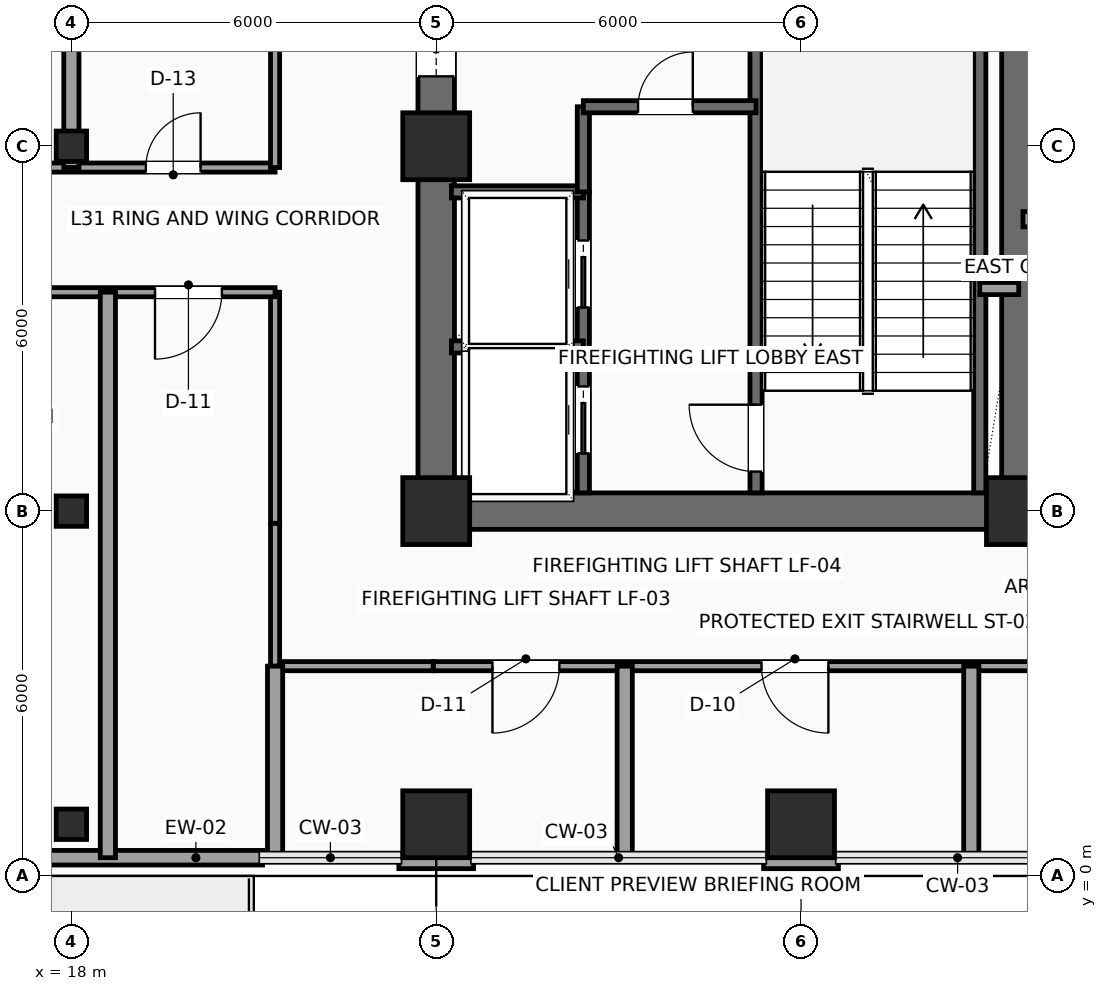
"""IFC4 building model, lengths in metres.
Left out: names, types, materials, properties, quantities, classifications, styles, units other than length and angle.
Written with IfcOpenShell. Run it as: python <this file> out.ifc"""

import sys

from ifc_helpers import new_model, si_unit, direction, frame, frame_2d, origin, origin_2d, place, context, subcontext, project, spatial, rectangle, hollow_rectangle, extrude, element, fill, save


model = new_model("IFC4")
c1 = context("Model", 3, precision=1e-05, world=origin(), true_north=direction((0.0, 1.0)))
c2 = subcontext(c1, "Body", "Model", "MODEL_VIEW")
j1 = project(units=[si_unit("LENGTHUNIT", "METRE"), si_unit("PLANEANGLEUNIT", "RADIAN")], contexts=[c1])
p1 = place(None, origin())
s1 = spatial("IfcSite", under=j1, at=p1, CompositionType="ELEMENT")
p2 = place(p1, origin())
s2 = spatial("IfcBuilding", under=s1, at=p2, CompositionType="ELEMENT")
p3 = place(p2, frame((0.0, 0.0, 130.65)))
s3 = spatial("IfcBuildingStorey", under=s2, at=p3, CompositionType="ELEMENT", Elevation=130.65)
for number, where, z_axis, x_axis in (
    (1, (24.0, 6.0, 0.0), (0.0, 0.0, 1.0), (1.0, 0.0, 0.0)),
    (2, (24.0, 12.0, 0.0), (0.0, 0.0, 1.0), (1.0, 0.0, 0.0)),
    (3, (33.6, 6.0, 0.0), (0.0, 0.0, 1.0), (1.0, 0.0, 0.0)),
):
    element("IfcColumn", number, at=place(p3, frame(where, z_axis=z_axis, x_axis=x_axis)), inside=s3, PredefinedType="COLUMN", context=c2, shape_type="SweptSolid", body=[
        extrude(rectangle(XDim=1.1, YDim=1.1, at=origin_2d()), origin(), (0.0, 0.0, 1.0), 3.75),
    ])
for number, where, z_axis, x_axis in (
    (4, (18.0, 0.85, 0.0), (0.0, 0.0, 1.0), (1.0, 0.0, 0.0)),
    (5, (18.0, 6.0, 0.0), (0.0, 0.0, 1.0), (1.0, 0.0, 0.0)),
    (6, (18.0, 12.0, 0.0), (0.0, 0.0, 1.0), (1.0, 0.0, 0.0)),
):
    element("IfcColumn", number, at=place(p3, frame(where, z_axis=z_axis, x_axis=x_axis)), inside=s3, PredefinedType="COLUMN", context=c2, shape_type="SweptSolid", body=[
        extrude(hollow_rectangle(XDim=0.5, YDim=0.5, WallThickness=0.025, InnerFilletRadius=0.025, OuterFilletRadius=0.04, at=origin_2d()), origin(), (0.0, 0.0, 1.0), 3.75),
    ])
for number, where, z_axis, x_axis in (
    (7, (24.0, 0.85, 0.0), (0.0, 0.0, 1.0), (1.0, 0.0, 0.0)),
    (8, (30.0, 0.85, 0.0), (0.0, 0.0, 1.0), (1.0, 0.0, 0.0)),
):
    element("IfcColumn", number, at=place(p3, frame(where, z_axis=z_axis, x_axis=x_axis)), inside=s3, PredefinedType="COLUMN", context=c2, shape_type="SweptSolid", body=[
        extrude(rectangle(XDim=1.1, YDim=1.1, at=origin_2d()), origin(), (0.0, 0.0, 1.0), 3.75),
    ])
p4 = place(p3, frame((21.145, 0.3, 0.0), z_axis=(0.0, 0.0, 1.0), x_axis=(-1.0, 0.0, 0.0)))
e9 = element("IfcWall", 9, at=p4, inside=s3, PredefinedType="SOLIDWALL", context=c2, shape_type="SweptSolid", body=[
    extrude(rectangle(XDim=9.29, YDim=0.24, at=frame_2d((4.645, 0.0))), origin(), (0.0, 0.0, 1.0), 3.525),
])
p5 = place(p4, frame((3.945, 0.0, 0.0)))
e10 = element("IfcOpeningElement", 10, at=p5, cuts=e9, PredefinedType="OPENING", context=c2, shape_type="SweptSolid", body=[
    extrude(rectangle(XDim=1.05, YDim=2.2, at=frame_2d((0.525, 1.1))), frame((0.0, 0.13, 0.0), z_axis=(0.0, -1.0, 0.0), x_axis=(1.0, 0.0, 0.0)), (0.0, 0.0, 1.0), 0.26),
])
p6 = place(p4, frame((5.345, 0.0, 0.85)))
e11 = element("IfcOpeningElement", 11, at=p6, cuts=e9, PredefinedType="OPENING", context=c2, shape_type="SweptSolid", body=[
    extrude(rectangle(XDim=1.8, YDim=2.1, at=frame_2d((0.9, 1.05))), frame((0.0, 0.13, 0.0), z_axis=(0.0, -1.0, 0.0), x_axis=(1.0, 0.0, 0.0)), (0.0, 0.0, 1.0), 0.26),
])
for number, where, z_axis, x_axis in (
    (12, (30.615, 0.24, 0.0), (0.0, 0.0, 1.0), (-1.0, 0.0, 0.0)),
    (13, (24.615, 0.24, 0.0), (0.0, 0.0, 1.0), (-1.0, 0.0, 0.0)),
):
    element("IfcWall", number, at=place(p3, frame(where, z_axis=z_axis, x_axis=x_axis)), inside=s3, PredefinedType="SOLIDWALL", context=c2, shape_type="SweptSolid", body=[
        extrude(rectangle(XDim=1.23, YDim=0.24, at=frame_2d((0.615, 0.0))), origin(), (0.0, 0.0, 1.0), 3.525),
    ])
p7 = place(p3, frame((24.0, 6.0, 0.0), z_axis=(0.0, 0.0, 1.0), x_axis=(1.0, 0.0, 0.0)))
e14 = element("IfcWall", 14, at=p7, inside=s3, PredefinedType="SHEAR", context=c2, shape_type="SweptSolid", body=[
    extrude(rectangle(XDim=9.6, YDim=0.6, at=frame_2d((4.8, 0.0))), origin(), (0.0, 0.0, 1.0), 3.525),
])
p8 = place(p3, frame((24.0, 6.0, 0.0), z_axis=(0.0, 0.0, 1.0), x_axis=(0.0, 1.0, 0.0)))
e15 = element("IfcWall", 15, at=p8, inside=s3, PredefinedType="SHEAR", context=c2, shape_type="SweptSolid", body=[
    extrude(rectangle(XDim=12.0, YDim=0.6, at=frame_2d((6.0, 0.0))), origin(), (0.0, 0.0, 1.0), 3.525),
])
p9 = place(p8, frame((7.15, 0.0, 0.0)))
e16 = element("IfcOpeningElement", 16, at=p9, cuts=e15, PredefinedType="OPENING", context=c2, shape_type="SweptSolid", body=[
    extrude(rectangle(XDim=1.6, YDim=2.3, at=frame_2d((0.8, 1.15))), frame((0.0, 0.31, 0.0), z_axis=(0.0, -1.0, 0.0), x_axis=(1.0, 0.0, 0.0)), (0.0, 0.0, 1.0), 0.62),
])
p10 = place(p3, frame((33.6, 6.0, 0.0), z_axis=(0.0, 0.0, 1.0), x_axis=(0.0, 1.0, 0.0)))
e17 = element("IfcWall", 17, at=p10, inside=s3, PredefinedType="SHEAR", context=c2, shape_type="SweptSolid", body=[
    extrude(rectangle(XDim=12.0, YDim=0.6, at=frame_2d((6.0, 0.0))), origin(), (0.0, 0.0, 1.0), 3.525),
])
p11 = place(p10, frame((10.2, 0.0, 0.0)))
e18 = element("IfcOpeningElement", 18, at=p11, cuts=e17, PredefinedType="OPENING", context=c2, shape_type="SweptSolid", body=[
    extrude(rectangle(XDim=0.9, YDim=2.15, at=frame_2d((0.45, 1.075))), frame((0.0, 0.31, 0.0), z_axis=(0.0, -1.0, 0.0), x_axis=(1.0, 0.0, 0.0)), (0.0, 0.0, 1.0), 0.62),
])
p12 = place(p3, frame((29.26, 6.3, 0.0), z_axis=(0.0, 0.0, 1.0), x_axis=(0.0, 1.0, 0.0)))
e19 = element("IfcWall", 19, at=p12, inside=s3, PredefinedType="SHEAR", context=c2, shape_type="SweptSolid", body=[
    extrude(rectangle(XDim=8.88, YDim=0.2, at=frame_2d((4.44, 0.0))), origin(), (0.0, 0.0, 1.0), 3.525),
])
p13 = place(p12, frame((0.35, 0.0, 0.0)))
e20 = element("IfcOpeningElement", 20, at=p13, cuts=e19, PredefinedType="OPENING", context=c2, shape_type="SweptSolid", body=[
    extrude(rectangle(XDim=1.1, YDim=2.2, at=frame_2d((0.55, 1.1))), frame((0.0, 0.11, 0.0), z_axis=(0.0, -1.0, 0.0), x_axis=(1.0, 0.0, 0.0)), (0.0, 0.0, 1.0), 0.22),
])
p14 = place(p3, frame((32.94, 6.3, 0.0), z_axis=(0.0, 0.0, 1.0), x_axis=(0.0, 1.0, 0.0)))
e21 = element("IfcWall", 21, at=p14, inside=s3, PredefinedType="SHEAR", context=c2, shape_type="SweptSolid", body=[
    extrude(rectangle(XDim=8.88, YDim=0.2, at=frame_2d((4.44, 0.0))), origin(), (0.0, 0.0, 1.0), 3.525),
])
p15 = place(p3, frame((26.42, 6.3, 0.0), z_axis=(0.0, 0.0, 1.0), x_axis=(0.0, 1.0, 0.0)))
e22 = element("IfcWall", 22, at=p15, inside=s3, PredefinedType="SHEAR", context=c2, shape_type="SweptSolid", body=[
    extrude(rectangle(XDim=4.95, YDim=0.2, at=frame_2d((2.475, 0.0))), origin(), (0.0, 0.0, 1.0), 3.525),
])
p16 = place(p15, frame((0.65, 0.0, 0.0)))
e23 = element("IfcOpeningElement", 23, at=p16, cuts=e22, PredefinedType="OPENING", context=c2, shape_type="SweptSolid", body=[
    extrude(rectangle(XDim=1.1, YDim=2.2, at=frame_2d((0.55, 1.1))), frame((0.0, 0.11, 0.0), z_axis=(0.0, -1.0, 0.0), x_axis=(1.0, 0.0, 0.0)), (0.0, 0.0, 1.0), 0.22),
])
p17 = place(p15, frame((3.05, 0.0, 0.0)))
e24 = element("IfcOpeningElement", 24, at=p17, cuts=e22, PredefinedType="OPENING", context=c2, shape_type="SweptSolid", body=[
    extrude(rectangle(XDim=1.1, YDim=2.2, at=frame_2d((0.55, 1.1))), frame((0.0, 0.11, 0.0), z_axis=(0.0, -1.0, 0.0), x_axis=(1.0, 0.0, 0.0)), (0.0, 0.0, 1.0), 0.22),
])
for number, where, z_axis, x_axis in (
    (25, (24.25, 8.7, 0.0), (0.0, 0.0, 1.0), (1.0, 0.0, 0.0)),
    (26, (24.25, 11.25, 0.0), (0.0, 0.0, 1.0), (1.0, 0.0, 0.0)),
):
    element("IfcWall", number, at=place(p3, frame(where, z_axis=z_axis, x_axis=x_axis)), inside=s3, PredefinedType="SHEAR", context=c2, shape_type="SweptSolid", body=[
        extrude(rectangle(XDim=2.17, YDim=0.2, at=frame_2d((1.085, 0.0))), origin(), (0.0, 0.0, 1.0), 3.525),
    ])
p18 = place(p3, frame((26.42, 11.25, 0.0), z_axis=(0.0, 0.0, 1.0), x_axis=(0.0, 1.0, 0.0)))
e27 = element("IfcWall", 27, at=p18, inside=s3, PredefinedType="SHEAR", context=c2, shape_type="SweptSolid", body=[
    extrude(rectangle(XDim=1.4, YDim=0.2, at=frame_2d((0.7, 0.0))), origin(), (0.0, 0.0, 1.0), 3.525),
])
p19 = place(p3, frame((26.42, 12.65, 0.0), z_axis=(0.0, 0.0, 1.0), x_axis=(1.0, 0.0, 0.0)))
e28 = element("IfcWall", 28, at=p19, inside=s3, PredefinedType="SHEAR", context=c2, shape_type="SweptSolid", body=[
    extrude(rectangle(XDim=2.84, YDim=0.2, at=frame_2d((1.42, 0.0))), origin(), (0.0, 0.0, 1.0), 3.525),
])
p20 = place(p19, frame((0.9, 0.0, 0.0)))
e29 = element("IfcOpeningElement", 29, at=p20, cuts=e28, PredefinedType="OPENING", context=c2, shape_type="SweptSolid", body=[
    extrude(rectangle(XDim=0.9, YDim=2.15, at=frame_2d((0.45, 1.075))), frame((0.0, 0.11, 0.0), z_axis=(0.0, -1.0, 0.0), x_axis=(1.0, 0.0, 0.0)), (0.0, 0.0, 1.0), 0.22),
])
p21 = place(p3, frame((32.94, 9.66, 0.0), z_axis=(0.0, 0.0, 1.0), x_axis=(1.0, 0.0, 0.0)))
e30 = element("IfcWall", 30, at=p21, inside=s3, PredefinedType="SOLIDWALL", context=c2, shape_type="SweptSolid", body=[
    extrude(rectangle(XDim=0.64, YDim=0.2, at=frame_2d((0.32, 0.0))), origin(), (0.0, 0.0, 1.0), 3.525),
])
p22 = place(p3, frame((36.15, 3.45, 0.0), z_axis=(0.0, 0.0, 1.0), x_axis=(-1.0, 0.0, 0.0)))
e31 = element("IfcWall", 31, at=p22, inside=s3, PredefinedType="PARTITIONING", context=c2, shape_type="SweptSolid", body=[
    extrude(rectangle(XDim=12.2, YDim=0.15, at=frame_2d((6.1, 0.0))), origin(), (0.0, 0.0, 1.0), 3.067),
])
p23 = place(p22, frame((10.125, 0.0, 0.0)))
e32 = element("IfcOpeningElement", 32, at=p23, cuts=e31, PredefinedType="OPENING", context=c2, shape_type="SweptSolid", body=[
    extrude(rectangle(XDim=1.1, YDim=2.25, at=frame_2d((0.55, 1.125))), frame((0.0, 0.085, 0.0), z_axis=(0.0, -1.0, 0.0), x_axis=(1.0, 0.0, 0.0)), (0.0, 0.0, 1.0), 0.17),
])
p24 = place(p22, frame((5.7, 0.0, 0.0)))
e33 = element("IfcOpeningElement", 33, at=p24, cuts=e31, PredefinedType="OPENING", context=c2, shape_type="SweptSolid", body=[
    extrude(rectangle(XDim=1.1, YDim=2.25, at=frame_2d((0.55, 1.125))), frame((0.0, 0.085, 0.0), z_axis=(0.0, -1.0, 0.0), x_axis=(1.0, 0.0, 0.0)), (0.0, 0.0, 1.0), 0.17),
])
p25 = place(p3, frame((23.95, 3.45, 0.0), z_axis=(0.0, 0.0, 1.0), x_axis=(-1.0, 0.0, 0.0)))
e34 = element("IfcWall", 34, at=p25, inside=s3, PredefinedType="PARTITIONING", context=c2, shape_type="SweptSolid", body=[
    extrude(rectangle(XDim=2.6, YDim=0.15, at=frame_2d((1.3, 0.0))), origin(), (0.0, 0.0, 1.0), 3.067),
])
p26 = place(p3, frame((21.35, 3.45, 0.0), z_axis=(0.0, 0.0, 1.0), x_axis=(0.0, 1.0, 0.0)))
e35 = element("IfcWall", 35, at=p26, inside=s3, PredefinedType="PARTITIONING", context=c2, shape_type="SweptSolid", body=[
    extrude(rectangle(XDim=2.35, YDim=0.15, at=frame_2d((1.175, 0.0))), origin(), (0.0, 0.0, 1.0), 3.525),
])
p27 = place(p3, frame((21.35, 5.8, 0.0), z_axis=(0.0, 0.0, 1.0), x_axis=(0.0, 1.0, 0.0)))
e36 = element("IfcWall", 36, at=p27, inside=s3, PredefinedType="PARTITIONING", context=c2, shape_type="SweptSolid", body=[
    extrude(rectangle(XDim=3.8, YDim=0.15, at=frame_2d((1.9, 0.0))), origin(), (0.0, 0.0, 1.0), 3.525),
])
p28 = place(p3, frame((21.35, 9.6, 0.0), z_axis=(0.0, 0.0, 1.0), x_axis=(-1.0, 0.0, 0.0)))
e37 = element("IfcWall", 37, at=p28, inside=s3, PredefinedType="PARTITIONING", context=c2, shape_type="SweptSolid", body=[
    extrude(rectangle(XDim=18.15, YDim=0.15, at=frame_2d((9.075, 0.0))), origin(), (0.0, 0.0, 1.0), 3.525),
])
p29 = place(p28, frame((13.55, 0.0, 0.0)))
e38 = element("IfcOpeningElement", 38, at=p29, cuts=e37, PredefinedType="OPENING", context=c2, shape_type="SweptSolid", body=[
    extrude(rectangle(XDim=1.1, YDim=2.25, at=frame_2d((0.55, 1.125))), frame((0.0, 0.085, 0.0), z_axis=(0.0, -1.0, 0.0), x_axis=(1.0, 0.0, 0.0)), (0.0, 0.0, 1.0), 0.17),
])
p30 = place(p28, frame((5.85, 0.0, 0.0)))
e39 = element("IfcOpeningElement", 39, at=p30, cuts=e37, PredefinedType="OPENING", context=c2, shape_type="SweptSolid", body=[
    extrude(rectangle(XDim=1.1, YDim=2.25, at=frame_2d((0.55, 1.125))), frame((0.0, 0.085, 0.0), z_axis=(0.0, -1.0, 0.0), x_axis=(1.0, 0.0, 0.0)), (0.0, 0.0, 1.0), 0.17),
])
p31 = place(p28, frame((0.875, 0.0, 0.0)))
e40 = element("IfcOpeningElement", 40, at=p31, cuts=e37, PredefinedType="OPENING", context=c2, shape_type="SweptSolid", body=[
    extrude(rectangle(XDim=1.1, YDim=2.25, at=frame_2d((0.55, 1.125))), frame((0.0, 0.085, 0.0), z_axis=(0.0, -1.0, 0.0), x_axis=(1.0, 0.0, 0.0)), (0.0, 0.0, 1.0), 0.17),
])
p32 = place(p3, frame((10.8, 11.65, 0.0), z_axis=(0.0, 0.0, 1.0), x_axis=(1.0, 0.0, 0.0)))
e41 = element("IfcWall", 41, at=p32, inside=s3, PredefinedType="PARTITIONING", context=c2, shape_type="SweptSolid", body=[
    extrude(rectangle(XDim=10.55, YDim=0.15, at=frame_2d((5.275, 0.0))), origin(), (0.0, 0.0, 1.0), 3.525),
])
p33 = place(p32, frame((1.98, 0.0, 0.0)))
e42 = element("IfcOpeningElement", 42, at=p33, cuts=e41, PredefinedType="OPENING", context=c2, shape_type="SweptSolid", body=[
    extrude(rectangle(XDim=1.1, YDim=2.25, at=frame_2d((0.55, 1.125))), frame((0.0, 0.085, 0.0), z_axis=(0.0, -1.0, 0.0), x_axis=(1.0, 0.0, 0.0)), (0.0, 0.0, 1.0), 0.17),
])
p34 = place(p32, frame((4.95, 0.0, 0.0)))
e43 = element("IfcOpeningElement", 43, at=p34, cuts=e41, PredefinedType="OPENING", context=c2, shape_type="SweptSolid", body=[
    extrude(rectangle(XDim=0.9, YDim=2.1, at=frame_2d((0.45, 1.05))), frame((0.0, 0.085, 0.0), z_axis=(0.0, -1.0, 0.0), x_axis=(1.0, 0.0, 0.0)), (0.0, 0.0, 1.0), 0.17),
])
p35 = place(p32, frame((8.425, 0.0, 0.0)))
e44 = element("IfcOpeningElement", 44, at=p35, cuts=e41, PredefinedType="OPENING", context=c2, shape_type="SweptSolid", body=[
    extrude(rectangle(XDim=0.9, YDim=2.1, at=frame_2d((0.45, 1.05))), frame((0.0, 0.085, 0.0), z_axis=(0.0, -1.0, 0.0), x_axis=(1.0, 0.0, 0.0)), (0.0, 0.0, 1.0), 0.17),
])
p36 = place(p3, frame((21.35, 11.65, 0.0), z_axis=(0.0, 0.0, 1.0), x_axis=(0.0, 1.0, 0.0)))
e45 = element("IfcWall", 45, at=p36, inside=s3, PredefinedType="PARTITIONING", context=c2, shape_type="SweptSolid", body=[
    extrude(rectangle(XDim=18.6, YDim=0.15, at=frame_2d((9.3, 0.0))), origin(), (0.0, 0.0, 1.0), 3.525),
])
p37 = place(p36, frame((7.2, 0.0, 0.0)))
e46 = element("IfcOpeningElement", 46, at=p37, cuts=e45, PredefinedType="OPENING", context=c2, shape_type="SweptSolid", body=[
    extrude(rectangle(XDim=0.95, YDim=2.15, at=frame_2d((0.475, 1.075))), frame((0.0, 0.085, 0.0), z_axis=(0.0, -1.0, 0.0), x_axis=(1.0, 0.0, 0.0)), (0.0, 0.0, 1.0), 0.17),
])
p38 = place(p36, frame((10.45, 0.0, 0.0)))
e47 = element("IfcOpeningElement", 47, at=p38, cuts=e45, PredefinedType="OPENING", context=c2, shape_type="SweptSolid", body=[
    extrude(rectangle(XDim=0.9, YDim=2.1, at=frame_2d((0.45, 1.05))), frame((0.0, 0.085, 0.0), z_axis=(0.0, -1.0, 0.0), x_axis=(1.0, 0.0, 0.0)), (0.0, 0.0, 1.0), 0.17),
])
p39 = place(p36, frame((13.9, 0.0, 0.0)))
e48 = element("IfcOpeningElement", 48, at=p39, cuts=e45, PredefinedType="OPENING", context=c2, shape_type="SweptSolid", body=[
    extrude(rectangle(XDim=0.95, YDim=2.15, at=frame_2d((0.475, 1.075))), frame((0.0, 0.085, 0.0), z_axis=(0.0, -1.0, 0.0), x_axis=(1.0, 0.0, 0.0)), (0.0, 0.0, 1.0), 0.17),
])
p40 = place(p36, frame((4.6, 0.0, 0.0)))
e49 = element("IfcOpeningElement", 49, at=p40, cuts=e45, PredefinedType="OPENING", context=c2, shape_type="SweptSolid", body=[
    extrude(rectangle(XDim=1.1, YDim=2.25, at=frame_2d((0.55, 1.125))), frame((0.0, 0.085, 0.0), z_axis=(0.0, -1.0, 0.0), x_axis=(1.0, 0.0, 0.0)), (0.0, 0.0, 1.0), 0.17),
])
p41 = place(p3, frame((18.0, 11.65, 0.0), z_axis=(0.0, 0.0, 1.0), x_axis=(0.0, 1.0, 0.0)))
e50 = element("IfcWall", 50, at=p41, inside=s3, PredefinedType="PARTITIONING", context=c2, shape_type="SweptSolid", body=[
    extrude(rectangle(XDim=3.9, YDim=0.25, at=frame_2d((1.95, 0.0))), origin(), (0.0, 0.0, 1.0), 3.017),
])
for number, where, z_axis, x_axis in (
    (51, (21.35, 0.3, 0.0), (0.0, 0.0, 1.0), (0.0, 1.0, 0.0)),
    (52, (27.1, 0.3, 0.0), (0.0, 0.0, 1.0), (0.0, 1.0, 0.0)),
    (53, (32.8, 0.3, 0.0), (0.0, 0.0, 1.0), (0.0, 1.0, 0.0)),
):
    element("IfcWall", number, at=place(p3, frame(where, z_axis=z_axis, x_axis=x_axis)), inside=s3, PredefinedType="PARTITIONING", context=c2, shape_type="SweptSolid", body=[
        extrude(rectangle(XDim=3.15, YDim=0.25, at=frame_2d((1.575, 0.0))), origin(), (0.0, 0.0, 1.0), 3.525),
    ])
p42 = place(p3, frame((33.65, 5.8, 0.0), z_axis=(0.0, 0.0, 1.0), x_axis=(1.0, 0.0, 0.0)))
e54 = element("IfcWall", 54, at=p42, inside=s3, PredefinedType="PARTITIONING", context=c2, shape_type="SweptSolid", body=[
    extrude(rectangle(XDim=2.5, YDim=0.25, at=frame_2d((1.25, 0.0))), origin(), (0.0, 0.0, 1.0), 3.017),
])
p43 = place(p3, frame((33.65, 10.8, 0.0), z_axis=(0.0, 0.0, 1.0), x_axis=(1.0, 0.0, 0.0)))
e55 = element("IfcWall", 55, at=p43, inside=s3, PredefinedType="PARTITIONING", context=c2, shape_type="SweptSolid", body=[
    extrude(rectangle(XDim=2.5, YDim=0.25, at=frame_2d((1.25, 0.0))), origin(), (0.0, 0.0, 1.0), 3.525),
])
p44 = place(p3, frame((18.6, 0.3, 0.0), z_axis=(0.0, 0.0, 1.0), x_axis=(0.0, 1.0, 0.0)))
e56 = element("IfcWall", 56, at=p44, inside=s3, PredefinedType="PARTITIONING", context=c2, shape_type="SweptSolid", body=[
    extrude(rectangle(XDim=9.3, YDim=0.25, at=frame_2d((4.65, 0.0))), origin(), (0.0, 0.0, 1.0), 3.525),
])
p45 = place(p9, origin())
e57 = element("IfcDoor", 57, at=p45, inside=s3, OperationType="DOUBLE_DOOR_SLIDING", PredefinedType="DOOR", context=c2, shape_type="SweptSolid", body=[
    extrude(rectangle(XDim=1.6, YDim=2.3, at=frame_2d((0.8, 1.15))), frame((0.0, 0.025, 0.0), z_axis=(0.0, -1.0, 0.0), x_axis=(1.0, 0.0, 0.0)), (0.0, 0.0, 1.0), 0.05),
])
fill(e16, e57)
p46 = place(p13, origin())
e58 = element("IfcDoor", 58, at=p46, inside=s3, OperationType="SINGLE_SWING_RIGHT", PredefinedType="DOOR", context=c2, shape_type="SweptSolid", body=[
    extrude(rectangle(XDim=1.1, YDim=2.2, at=frame_2d((0.55, 1.1))), frame((0.0, 0.025, 0.0), z_axis=(0.0, -1.0, 0.0), x_axis=(1.0, 0.0, 0.0)), (0.0, 0.0, 1.0), 0.05),
])
fill(e20, e58)
p47 = place(p16, origin())
e59 = element("IfcDoor", 59, at=p47, inside=s3, OperationType="SLIDING_TO_LEFT", PredefinedType="DOOR", context=c2, shape_type="SweptSolid", body=[
    extrude(rectangle(XDim=1.1, YDim=2.2, at=frame_2d((0.55, 1.1))), frame((0.0, 0.025, 0.0), z_axis=(0.0, -1.0, 0.0), x_axis=(1.0, 0.0, 0.0)), (0.0, 0.0, 1.0), 0.05),
])
fill(e23, e59)
p48 = place(p17, origin())
e60 = element("IfcDoor", 60, at=p48, inside=s3, OperationType="SLIDING_TO_LEFT", PredefinedType="DOOR", context=c2, shape_type="SweptSolid", body=[
    extrude(rectangle(XDim=1.1, YDim=2.2, at=frame_2d((0.55, 1.1))), frame((0.0, 0.025, 0.0), z_axis=(0.0, -1.0, 0.0), x_axis=(1.0, 0.0, 0.0)), (0.0, 0.0, 1.0), 0.05),
])
fill(e24, e60)
p49 = place(p20, origin())
e61 = element("IfcDoor", 61, at=p49, inside=s3, OperationType="SINGLE_SWING_RIGHT", PredefinedType="DOOR", context=c2, shape_type="SweptSolid", body=[
    extrude(rectangle(XDim=0.9, YDim=2.15, at=frame_2d((0.45, 1.075))), frame((0.0, 0.025, 0.0), z_axis=(0.0, -1.0, 0.0), x_axis=(1.0, 0.0, 0.0)), (0.0, 0.0, 1.0), 0.05),
])
fill(e29, e61)
p50 = place(p23, origin())
e62 = element("IfcDoor", 62, at=p50, inside=s3, OperationType="SINGLE_SWING_RIGHT", PredefinedType="DOOR", context=c2, shape_type="SweptSolid", body=[
    extrude(rectangle(XDim=1.1, YDim=2.25, at=frame_2d((0.55, 1.125))), frame((0.0, 0.025, 0.0), z_axis=(0.0, -1.0, 0.0), x_axis=(1.0, 0.0, 0.0)), (0.0, 0.0, 1.0), 0.05),
])
fill(e32, e62)
p51 = place(p24, origin())
e63 = element("IfcDoor", 63, at=p51, inside=s3, OperationType="SINGLE_SWING_LEFT", PredefinedType="DOOR", context=c2, shape_type="SweptSolid", body=[
    extrude(rectangle(XDim=1.1, YDim=2.25, at=frame_2d((0.55, 1.125))), frame((0.0, 0.025, 0.0), z_axis=(0.0, -1.0, 0.0), x_axis=(1.0, 0.0, 0.0)), (0.0, 0.0, 1.0), 0.05),
])
fill(e33, e63)
p52 = place(p31, origin())
e64 = element("IfcDoor", 64, at=p52, inside=s3, OperationType="SINGLE_SWING_RIGHT", PredefinedType="DOOR", context=c2, shape_type="SweptSolid", body=[
    extrude(rectangle(XDim=1.1, YDim=2.25, at=frame_2d((0.55, 1.125))), frame((0.0, 0.025, 0.0), z_axis=(0.0, -1.0, 0.0), x_axis=(1.0, 0.0, 0.0)), (0.0, 0.0, 1.0), 0.05),
])
fill(e40, e64)
p53 = place(p35, origin())
e65 = element("IfcDoor", 65, at=p53, inside=s3, OperationType="SINGLE_SWING_RIGHT", PredefinedType="DOOR", context=c2, shape_type="SweptSolid", body=[
    extrude(rectangle(XDim=0.9, YDim=2.1, at=frame_2d((0.45, 1.05))), frame((0.0, 0.025, 0.0), z_axis=(0.0, -1.0, 0.0), x_axis=(1.0, 0.0, 0.0)), (0.0, 0.0, 1.0), 0.05),
])
fill(e44, e65)
save(model, sys.argv[1])
